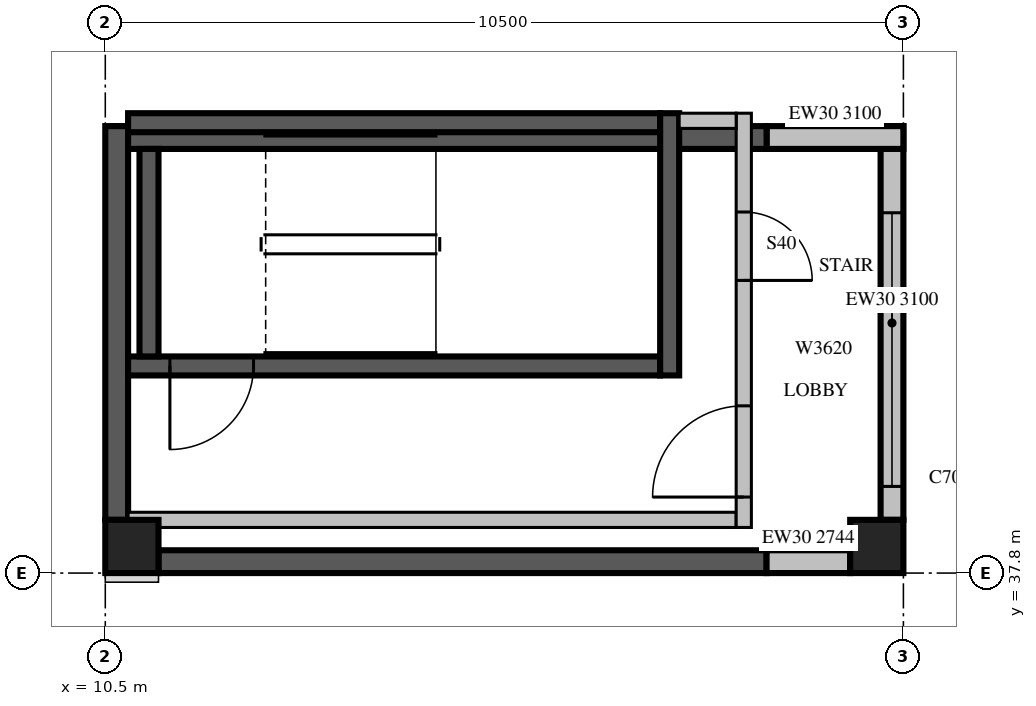
"""IFC4 building model, lengths in metres.
Left out: names, types, materials, properties, quantities, classifications, styles, units other than length and angle.
Written with IfcOpenShell. Run it as: python <this file> out.ifc"""

import sys

from ifc_helpers import new_model, si_unit, direction, frame, frame_2d, origin, origin_2d, place, context, subcontext, project, spatial, rectangle, extrude, source, transform, mapped, element, fill, save


model = new_model("IFC4")
c1 = context("Model", 3, precision=1e-05, world=origin(), true_north=direction((0.0, 1.0)))
c2 = subcontext(c1, "Body", "Model", "MODEL_VIEW")
j1 = project(units=[si_unit("LENGTHUNIT", "METRE"), si_unit("PLANEANGLEUNIT", "RADIAN")], contexts=[c1])
p1 = place(None, origin())
s1 = spatial("IfcSite", under=j1, at=p1, CompositionType="ELEMENT")
p2 = place(p1, origin())
s2 = spatial("IfcBuilding", under=s1, at=p2, CompositionType="ELEMENT")
p3 = place(p2, frame((0.0, 0.0, 319.5)))
s3 = spatial("IfcBuildingStorey", under=s2, at=p3, CompositionType="ELEMENT", Elevation=319.5)
m1 = source(origin(), c2, "Body", "SweptSolid", [
    extrude(rectangle(XDim=0.7, YDim=0.7, at=origin_2d()), origin(), (0.0, 0.0, 1.0), 3.5),
])
for number, where, z_axis, x_axis in (
    (1, (10.85, 38.15, 0.0), (0.0, 0.0, 1.0), (1.0, 0.0, 0.0)),
    (2, (20.65, 38.15, 0.0), (0.0, 0.0, 1.0), (1.0, 0.0, 0.0)),
):
    element("IfcColumn", number, at=place(p3, frame(where, z_axis=z_axis, x_axis=x_axis)), inside=s3, PredefinedType="COLUMN", context=c2, shape_type="MappedRepresentation", body=[
        mapped(m1, transform((0.0, 0.0, 0.0), scale=1.0)),
    ])
m2 = source(origin(), c2, "Body", "SweptSolid", [
    extrude(rectangle(XDim=8.0, YDim=0.3, at=frame_2d((4.0, 0.0))), origin(), (0.0, 0.0, 1.0), 3.1),
])
p4 = place(p3, frame((11.2, 37.95, 0.0), z_axis=(0.0, 0.0, 1.0), x_axis=(1.0, 0.0, 0.0)))
e3 = element("IfcWall", 3, at=p4, inside=s3, PredefinedType="SOLIDWALL", context=c2, shape_type="MappedRepresentation", body=[
    mapped(m2, transform((0.0, 0.0, 0.0), scale=1.0)),
])
m3 = source(origin(), c2, "Body", "SweptSolid", [
    extrude(rectangle(XDim=1.1, YDim=0.3, at=frame_2d((0.55, 0.0))), origin(), (0.0, 0.0, 1.0), 2.744),
])
p5 = place(p3, frame((19.2, 37.95, 0.0), z_axis=(0.0, 0.0, 1.0), x_axis=(1.0, 0.0, 0.0)))
e4 = element("IfcWall", 4, at=p5, inside=s3, PredefinedType="STANDARD", context=c2, shape_type="MappedRepresentation", body=[
    mapped(m3, transform((0.0, 0.0, 0.0), scale=1.0)),
])
m4 = source(origin(), c2, "Body", "SweptSolid", [
    extrude(rectangle(XDim=5.18, YDim=0.3, at=frame_2d((2.59, 0.0))), origin(), (0.0, 0.0, 1.0), 3.1),
])
p6 = place(p3, frame((20.85, 38.5, 0.0), z_axis=(0.0, 0.0, 1.0), x_axis=(0.0, 1.0, 0.0)))
e5 = element("IfcWall", 5, at=p6, inside=s3, PredefinedType="STANDARD", context=c2, shape_type="MappedRepresentation", body=[
    mapped(m4, transform((0.0, 0.0, 0.0), scale=1.0)),
])
m5 = source(origin(), c2, "Body", "SweptSolid", [
    extrude(rectangle(XDim=3.6, YDim=2.0, at=frame_2d((1.8, 1.0))), frame((0.0, 0.16, 0.0), z_axis=(0.0, -1.0, 0.0), x_axis=(1.0, 0.0, 0.0)), (0.0, 0.0, 1.0), 0.32),
])
p7 = place(p6, frame((0.44, 0.0, 0.6)))
e6 = element("IfcOpeningElement", 6, at=p7, cuts=e5, PredefinedType="OPENING", context=c2, shape_type="MappedRepresentation", body=[
    mapped(m5, transform((0.0, 0.0, 0.0), scale=1.0)),
])
m6 = source(origin(), c2, "Body", "SweptSolid", [
    extrude(rectangle(XDim=1.8, YDim=0.3, at=frame_2d((0.9, 0.0))), origin(), (0.0, 0.0, 1.0), 3.1),
])
p8 = place(p3, frame((21.0, 43.53, 0.0), z_axis=(0.0, 0.0, 1.0), x_axis=(-1.0, 0.0, 0.0)))
e7 = element("IfcWall", 7, at=p8, inside=s3, PredefinedType="STANDARD", context=c2, shape_type="MappedRepresentation", body=[
    mapped(m6, transform((0.0, 0.0, 0.0), scale=1.0)),
])
m7 = source(origin(), c2, "Body", "SweptSolid", [
    extrude(rectangle(XDim=8.6, YDim=0.3, at=frame_2d((4.3, 0.0))), origin(), (0.0, 0.0, 1.0), 3.1),
])
p9 = place(p3, frame((19.2, 43.53, 0.0), z_axis=(0.0, 0.0, 1.0), x_axis=(-1.0, 0.0, 0.0)))
e8 = element("IfcWall", 8, at=p9, inside=s3, PredefinedType="SOLIDWALL", context=c2, shape_type="MappedRepresentation", body=[
    mapped(m7, transform((0.0, 0.0, 0.0), scale=1.0)),
])
m8 = source(origin(), c2, "Body", "SweptSolid", [
    extrude(rectangle(XDim=5.18, YDim=0.3, at=frame_2d((2.59, 0.0))), origin(), (0.0, 0.0, 1.0), 3.1),
])
p10 = place(p3, frame((10.65, 43.68, 0.0), z_axis=(0.0, 0.0, 1.0), x_axis=(0.0, -1.0, 0.0)))
e9 = element("IfcWall", 9, at=p10, inside=s3, PredefinedType="SOLIDWALL", context=c2, shape_type="MappedRepresentation", body=[
    mapped(m8, transform((0.0, 0.0, 0.0), scale=1.0)),
])
m9 = source(origin(), c2, "Body", "SweptSolid", [
    extrude(rectangle(XDim=7.0, YDim=0.25, at=frame_2d((3.5, 0.0))), origin(), (0.0, 0.0, 1.0), 3.1),
])
p11 = place(p3, frame((10.8, 40.525, 0.0), z_axis=(0.0, 0.0, 1.0), x_axis=(1.0, 0.0, 0.0)))
e10 = element("IfcWall", 10, at=p11, inside=s3, PredefinedType="SOLIDWALL", context=c2, shape_type="MappedRepresentation", body=[
    mapped(m9, transform((0.0, 0.0, 0.0), scale=1.0)),
])
m10 = source(origin(), c2, "Body", "SweptSolid", [
    extrude(rectangle(XDim=1.1, YDim=2.1, at=frame_2d((0.55, 1.05))), frame((0.0, 0.135, 0.0), z_axis=(0.0, -1.0, 0.0), x_axis=(1.0, 0.0, 0.0)), (0.0, 0.0, 1.0), 0.27),
])
p12 = place(p11, frame((0.55, 0.0, 0.0)))
e11 = element("IfcOpeningElement", 11, at=p12, cuts=e10, PredefinedType="OPENING", context=c2, shape_type="MappedRepresentation", body=[
    mapped(m10, transform((0.0, 0.0, 0.0), scale=1.0)),
])
p13 = place(p3, frame((10.8, 43.725, 0.0), z_axis=(0.0, 0.0, 1.0), x_axis=(1.0, 0.0, 0.0)))
e12 = element("IfcWall", 12, at=p13, inside=s3, PredefinedType="SOLIDWALL", context=c2, shape_type="MappedRepresentation", body=[
    mapped(m9, transform((0.0, 0.0, 0.0), scale=1.0)),
])
m11 = source(origin(), c2, "Body", "SweptSolid", [
    extrude(rectangle(XDim=3.45, YDim=0.25, at=frame_2d((1.725, 0.0))), origin(), (0.0, 0.0, 1.0), 3.1),
])
p14 = place(p3, frame((17.925, 40.4, 0.0), z_axis=(0.0, 0.0, 1.0), x_axis=(0.0, 1.0, 0.0)))
e13 = element("IfcWall", 13, at=p14, inside=s3, PredefinedType="SOLIDWALL", context=c2, shape_type="MappedRepresentation", body=[
    mapped(m11, transform((0.0, 0.0, 0.0), scale=1.0)),
])
m12 = source(origin(), c2, "Body", "SweptSolid", [
    extrude(rectangle(XDim=2.73, YDim=0.25, at=frame_2d((1.365, 0.0))), origin(), (0.0, 0.0, 1.0), 3.1),
])
p15 = place(p3, frame((11.075, 40.65, 0.0), z_axis=(0.0, 0.0, 1.0), x_axis=(0.0, 1.0, 0.0)))
e14 = element("IfcWall", 14, at=p15, inside=s3, PredefinedType="SOLIDWALL", context=c2, shape_type="MappedRepresentation", body=[
    mapped(m12, transform((0.0, 0.0, 0.0), scale=1.0)),
])
m13 = source(origin(), c2, "Body", "SweptSolid", [
    extrude(rectangle(XDim=8.0, YDim=0.2, at=frame_2d((4.0, 0.0))), origin(), (0.0, 0.0, 1.0), 3.1),
])
p16 = place(p3, frame((10.8, 38.5, 0.0), z_axis=(0.0, 0.0, 1.0), x_axis=(1.0, 0.0, 0.0)))
e15 = element("IfcWall", 15, at=p16, inside=s3, PredefinedType="PARTITIONING", context=c2, shape_type="MappedRepresentation", body=[
    mapped(m13, transform((0.0, 0.0, 0.0), scale=1.0)),
])
m14 = source(origin(), c2, "Body", "SweptSolid", [
    extrude(rectangle(XDim=5.45, YDim=0.2, at=frame_2d((2.725, 0.0))), origin(), (0.0, 0.0, 1.0), 3.1),
])
p17 = place(p3, frame((18.9, 38.4, 0.0), z_axis=(0.0, 0.0, 1.0), x_axis=(0.0, 1.0, 0.0)))
e16 = element("IfcWall", 16, at=p17, inside=s3, PredefinedType="PARTITIONING", context=c2, shape_type="MappedRepresentation", body=[
    mapped(m14, transform((0.0, 0.0, 0.0), scale=1.0)),
])
m15 = source(origin(), c2, "Body", "SweptSolid", [
    extrude(rectangle(XDim=1.2, YDim=2.1, at=frame_2d((0.6, 1.05))), frame((0.0, 0.11, 0.0), z_axis=(0.0, -1.0, 0.0), x_axis=(1.0, 0.0, 0.0)), (0.0, 0.0, 1.0), 0.22),
])
p18 = place(p17, frame((0.4, 0.0, 0.0)))
e17 = element("IfcOpeningElement", 17, at=p18, cuts=e16, PredefinedType="OPENING", context=c2, shape_type="MappedRepresentation", body=[
    mapped(m15, transform((0.0, 0.0, 0.0), scale=1.0)),
])
m16 = source(origin(), c2, "Body", "SweptSolid", [
    extrude(rectangle(XDim=0.9, YDim=2.1, at=frame_2d((0.45, 1.05))), frame((0.0, 0.11, 0.0), z_axis=(0.0, -1.0, 0.0), x_axis=(1.0, 0.0, 0.0)), (0.0, 0.0, 1.0), 0.22),
])
p19 = place(p17, frame((3.25, 0.0, 0.0)))
e18 = element("IfcOpeningElement", 18, at=p19, cuts=e16, PredefinedType="OPENING", context=c2, shape_type="MappedRepresentation", body=[
    mapped(m16, transform((0.0, 0.0, 0.0), scale=1.0)),
])
m17 = source(origin(), c2, "Body", "SweptSolid", [
    extrude(rectangle(XDim=0.75, YDim=0.2, at=frame_2d((0.375, 0.0))), origin(), (0.0, 0.0, 1.0), 3.1),
])
p20 = place(p3, frame((18.05, 43.75, 0.0), z_axis=(0.0, 0.0, 1.0), x_axis=(1.0, 0.0, 0.0)))
e19 = element("IfcWall", 19, at=p20, inside=s3, PredefinedType="PARTITIONING", context=c2, shape_type="MappedRepresentation", body=[
    mapped(m17, transform((0.0, 0.0, 0.0), scale=1.0)),
])
m18 = source(origin(), c2, "Body", "SweptSolid", [
    extrude(rectangle(XDim=3.6, YDim=2.0, at=frame_2d((1.8, 1.0))), frame((0.0, 0.03, 0.0), z_axis=(0.0, -1.0, 0.0), x_axis=(1.0, 0.0, 0.0)), (0.0, 0.0, 1.0), 0.06),
])
p21 = place(p7, origin())
e20 = element("IfcWindow", 20, at=p21, inside=s3, PartitioningType="SINGLE_PANEL", PredefinedType="WINDOW", context=c2, shape_type="MappedRepresentation", body=[
    mapped(m18, transform((0.0, 0.0, 0.0), scale=1.0)),
])
fill(e6, e20)
m19 = source(origin(), c2, "Body", "SweptSolid", [
    extrude(rectangle(XDim=1.1, YDim=2.1, at=frame_2d((0.55, 1.05))), frame((0.0, 0.025, 0.0), z_axis=(0.0, -1.0, 0.0), x_axis=(1.0, 0.0, 0.0)), (0.0, 0.0, 1.0), 0.05),
])
p22 = place(p12, origin())
e21 = element("IfcDoor", 21, at=p22, inside=s3, OperationType="SINGLE_SWING_RIGHT", PredefinedType="DOOR", context=c2, shape_type="MappedRepresentation", body=[
    mapped(m19, transform((0.0, 0.0, 0.0), scale=1.0)),
])
fill(e11, e21)
m20 = source(origin(), c2, "Body", "SweptSolid", [
    extrude(rectangle(XDim=1.2, YDim=2.1, at=frame_2d((0.6, 1.05))), frame((0.0, 0.025, 0.0), z_axis=(0.0, -1.0, 0.0), x_axis=(1.0, 0.0, 0.0)), (0.0, 0.0, 1.0), 0.05),
])
p23 = place(p18, origin())
e22 = element("IfcDoor", 22, at=p23, inside=s3, OperationType="SINGLE_SWING_LEFT", PredefinedType="DOOR", context=c2, shape_type="MappedRepresentation", body=[
    mapped(m20, transform((0.0, 0.0, 0.0), scale=1.0)),
])
fill(e17, e22)
m21 = source(origin(), c2, "Body", "SweptSolid", [
    extrude(rectangle(XDim=0.9, YDim=2.1, at=frame_2d((0.45, 1.05))), frame((0.0, 0.025, 0.0), z_axis=(0.0, -1.0, 0.0), x_axis=(1.0, 0.0, 0.0)), (0.0, 0.0, 1.0), 0.05),
])
p24 = place(p19, origin())
e23 = element("IfcDoor", 23, at=p24, inside=s3, OperationType="SINGLE_SWING_RIGHT", PredefinedType="DOOR", context=c2, shape_type="MappedRepresentation", body=[
    mapped(m21, transform((0.0, 0.0, 0.0), scale=1.0)),
])
fill(e18, e23)
save(model, sys.argv[1])
